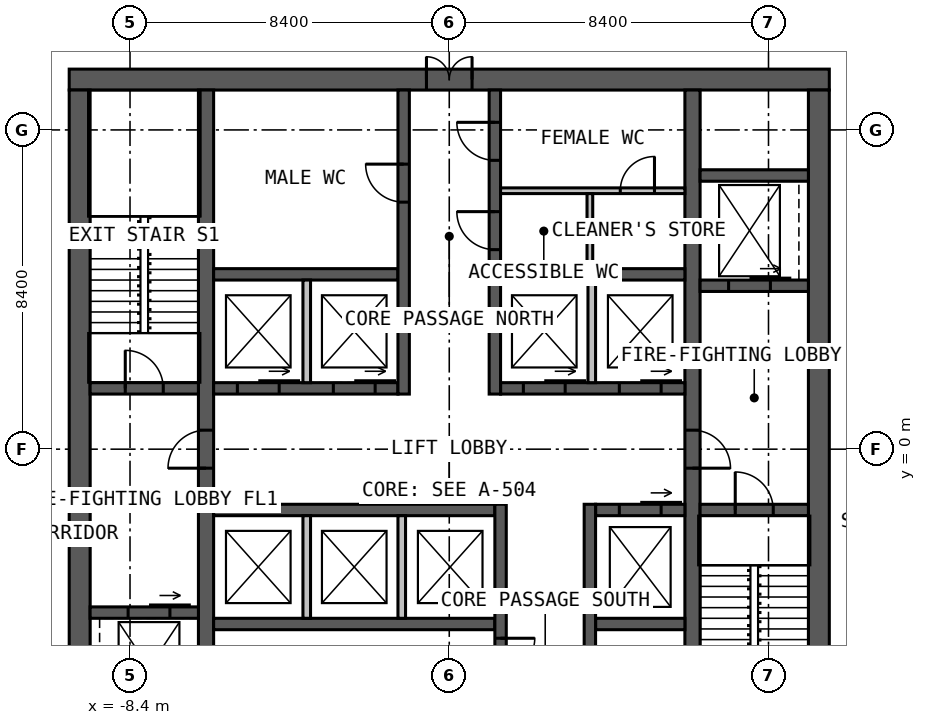
"""IFC4 building model, lengths in metres.
Left out: names, types, materials, properties, quantities, classifications, styles, units other than length and angle.
Written with IfcOpenShell. Run it as: python <this file> out.ifc"""

import sys

from ifc_helpers import new_model, si_unit, direction, frame, frame_2d, origin, place, context, subcontext, project, spatial, rectangle, extrude, element, fill, save


model = new_model("IFC4")
c1 = context("Model", 3, precision=1e-05, world=origin(), true_north=direction((0.0, 1.0)))
c2 = subcontext(c1, "Body", "Model", "MODEL_VIEW")
j1 = project(units=[si_unit("LENGTHUNIT", "METRE"), si_unit("PLANEANGLEUNIT", "RADIAN")], contexts=[c1])
p1 = place(None, origin())
s1 = spatial("IfcSite", under=j1, at=p1, CompositionType="ELEMENT")
p2 = place(p1, origin())
s2 = spatial("IfcBuilding", under=s1, at=p2, CompositionType="ELEMENT")
p3 = place(p2, frame((0.0, 0.0, 114.0)))
s3 = spatial("IfcBuildingStorey", under=s2, at=p3, CompositionType="ELEMENT", Elevation=114.0)
p4 = place(p3, frame((-10.0, 9.725, 0.0), z_axis=(0.0, 0.0, 1.0), x_axis=(1.0, 0.0, 0.0)))
e1 = element("IfcWall", 1, at=p4, inside=s3, PredefinedType="SOLIDWALL", context=c2, shape_type="SweptSolid", body=[
    extrude(rectangle(XDim=20.0, YDim=0.55, at=frame_2d((10.0, 0.0))), origin(), (0.0, 0.0, 1.0), 4.0),
])
p5 = place(p4, frame((9.4, 0.0, 0.0)))
e2 = element("IfcOpeningElement", 2, at=p5, cuts=e1, PredefinedType="OPENING", context=c2, shape_type="SweptSolid", body=[
    extrude(rectangle(XDim=1.2, YDim=2.2, at=frame_2d((0.6, 1.1))), frame((0.0, 0.285, 0.0), z_axis=(0.0, -1.0, 0.0), x_axis=(1.0, 0.0, 0.0)), (0.0, 0.0, 1.0), 0.57),
])
for number, where, z_axis, x_axis in (
    (3, (9.725, -9.45, 0.0), (0.0, 0.0, 1.0), (0.0, 1.0, 0.0)),
    (4, (-9.725, 9.45, 0.0), (0.0, 0.0, 1.0), (0.0, -1.0, 0.0)),
):
    element("IfcWall", number, at=place(p3, frame(where, z_axis=z_axis, x_axis=x_axis)), inside=s3, PredefinedType="SOLIDWALL", context=c2, shape_type="SweptSolid", body=[
        extrude(rectangle(XDim=18.9, YDim=0.55, at=frame_2d((9.45, 0.0))), origin(), (0.0, 0.0, 1.0), 4.0),
    ])
p6 = place(p3, frame((-6.4, -9.45, 0.0), z_axis=(0.0, 0.0, 1.0), x_axis=(0.0, 1.0, 0.0)))
e5 = element("IfcWall", 5, at=p6, inside=s3, PredefinedType="SOLIDWALL", context=c2, shape_type="SweptSolid", body=[
    extrude(rectangle(XDim=18.9, YDim=0.4, at=frame_2d((9.45, 0.0))), origin(), (0.0, 0.0, 1.0), 4.0),
])
p7 = place(p6, frame((8.95, 0.0, 0.0)))
e6 = element("IfcOpeningElement", 6, at=p7, cuts=e5, PredefinedType="OPENING", context=c2, shape_type="SweptSolid", body=[
    extrude(rectangle(XDim=1.0, YDim=2.2, at=frame_2d((0.5, 1.1))), frame((0.0, 0.21, 0.0), z_axis=(0.0, -1.0, 0.0), x_axis=(1.0, 0.0, 0.0)), (0.0, 0.0, 1.0), 0.42),
])
p8 = place(p3, frame((6.4, 9.45, 0.0), z_axis=(0.0, 0.0, 1.0), x_axis=(0.0, -1.0, 0.0)))
e7 = element("IfcWall", 7, at=p8, inside=s3, PredefinedType="SOLIDWALL", context=c2, shape_type="SweptSolid", body=[
    extrude(rectangle(XDim=18.9, YDim=0.4, at=frame_2d((9.45, 0.0))), origin(), (0.0, 0.0, 1.0), 4.0),
])
p9 = place(p8, frame((8.95, 0.0, 0.0)))
e8 = element("IfcOpeningElement", 8, at=p9, cuts=e7, PredefinedType="OPENING", context=c2, shape_type="SweptSolid", body=[
    extrude(rectangle(XDim=1.0, YDim=2.2, at=frame_2d((0.5, 1.1))), frame((0.0, 0.21, 0.0), z_axis=(0.0, -1.0, 0.0), x_axis=(1.0, 0.0, 0.0)), (0.0, 0.0, 1.0), 0.42),
])
p10 = place(p3, frame((-6.2, 1.6, 0.0), z_axis=(0.0, 0.0, 1.0), x_axis=(1.0, 0.0, 0.0)))
e9 = element("IfcWall", 9, at=p10, inside=s3, PredefinedType="SOLIDWALL", context=c2, shape_type="SweptSolid", body=[
    extrude(rectangle(XDim=4.85, YDim=0.3, at=frame_2d((2.425, 0.0))), origin(), (0.0, 0.0, 1.0), 4.0),
])
p11 = place(p10, frame((0.625, 0.0, 0.0)))
e10 = element("IfcOpeningElement", 10, at=p11, cuts=e9, PredefinedType="OPENING", context=c2, shape_type="SweptSolid", body=[
    extrude(rectangle(XDim=1.1, YDim=2.2, at=frame_2d((0.55, 1.1))), frame((0.0, 0.16, 0.0), z_axis=(0.0, -1.0, 0.0), x_axis=(1.0, 0.0, 0.0)), (0.0, 0.0, 1.0), 0.32),
])
p12 = place(p10, frame((3.15, 0.0, 0.0)))
e11 = element("IfcOpeningElement", 11, at=p12, cuts=e9, PredefinedType="OPENING", context=c2, shape_type="SweptSolid", body=[
    extrude(rectangle(XDim=1.1, YDim=2.2, at=frame_2d((0.55, 1.1))), frame((0.0, 0.16, 0.0), z_axis=(0.0, -1.0, 0.0), x_axis=(1.0, 0.0, 0.0)), (0.0, 0.0, 1.0), 0.32),
])
p13 = place(p3, frame((1.35, 1.6, 0.0), z_axis=(0.0, 0.0, 1.0), x_axis=(1.0, 0.0, 0.0)))
e12 = element("IfcWall", 12, at=p13, inside=s3, PredefinedType="SOLIDWALL", context=c2, shape_type="SweptSolid", body=[
    extrude(rectangle(XDim=4.85, YDim=0.3, at=frame_2d((2.425, 0.0))), origin(), (0.0, 0.0, 1.0), 4.0),
])
p14 = place(p13, frame((0.6, 0.0, 0.0)))
e13 = element("IfcOpeningElement", 13, at=p14, cuts=e12, PredefinedType="OPENING", context=c2, shape_type="SweptSolid", body=[
    extrude(rectangle(XDim=1.1, YDim=2.2, at=frame_2d((0.55, 1.1))), frame((0.0, 0.16, 0.0), z_axis=(0.0, -1.0, 0.0), x_axis=(1.0, 0.0, 0.0)), (0.0, 0.0, 1.0), 0.32),
])
p15 = place(p13, frame((3.125, 0.0, 0.0)))
e14 = element("IfcOpeningElement", 14, at=p15, cuts=e12, PredefinedType="OPENING", context=c2, shape_type="SweptSolid", body=[
    extrude(rectangle(XDim=1.1, YDim=2.2, at=frame_2d((0.55, 1.1))), frame((0.0, 0.16, 0.0), z_axis=(0.0, -1.0, 0.0), x_axis=(1.0, 0.0, 0.0)), (0.0, 0.0, 1.0), 0.32),
])
for number, where, z_axis, x_axis in (
    (15, (-6.2, 4.6, 0.0), (0.0, 0.0, 1.0), (1.0, 0.0, 0.0)),
    (16, (1.35, 4.6, 0.0), (0.0, 0.0, 1.0), (1.0, 0.0, 0.0)),
):
    element("IfcWall", number, at=place(p3, frame(where, z_axis=z_axis, x_axis=x_axis)), inside=s3, PredefinedType="SOLIDWALL", context=c2, shape_type="SweptSolid", body=[
        extrude(rectangle(XDim=4.85, YDim=0.3, at=frame_2d((2.425, 0.0))), origin(), (0.0, 0.0, 1.0), 4.0),
    ])
p16 = place(p3, frame((-1.2, 1.45, 0.0), z_axis=(0.0, 0.0, 1.0), x_axis=(0.0, 1.0, 0.0)))
e17 = element("IfcWall", 17, at=p16, inside=s3, PredefinedType="SOLIDWALL", context=c2, shape_type="SweptSolid", body=[
    extrude(rectangle(XDim=8.0, YDim=0.3, at=frame_2d((4.0, 0.0))), origin(), (0.0, 0.0, 1.0), 4.0),
])
p17 = place(p16, frame((5.05, 0.0, 0.0)))
e18 = element("IfcOpeningElement", 18, at=p17, cuts=e17, PredefinedType="OPENING", context=c2, shape_type="SweptSolid", body=[
    extrude(rectangle(XDim=1.0, YDim=2.2, at=frame_2d((0.5, 1.1))), frame((0.0, 0.16, 0.0), z_axis=(0.0, -1.0, 0.0), x_axis=(1.0, 0.0, 0.0)), (0.0, 0.0, 1.0), 0.32),
])
p18 = place(p3, frame((1.2, 1.45, 0.0), z_axis=(0.0, 0.0, 1.0), x_axis=(0.0, 1.0, 0.0)))
e19 = element("IfcWall", 19, at=p18, inside=s3, PredefinedType="SOLIDWALL", context=c2, shape_type="SweptSolid", body=[
    extrude(rectangle(XDim=8.0, YDim=0.3, at=frame_2d((4.0, 0.0))), origin(), (0.0, 0.0, 1.0), 4.0),
])
p19 = place(p18, frame((3.8, 0.0, 0.0)))
e20 = element("IfcOpeningElement", 20, at=p19, cuts=e19, PredefinedType="OPENING", context=c2, shape_type="SweptSolid", body=[
    extrude(rectangle(XDim=1.0, YDim=2.2, at=frame_2d((0.5, 1.1))), frame((0.0, 0.16, 0.0), z_axis=(0.0, -1.0, 0.0), x_axis=(1.0, 0.0, 0.0)), (0.0, 0.0, 1.0), 0.32),
])
p20 = place(p18, frame((6.15, 0.0, 0.0)))
e21 = element("IfcOpeningElement", 21, at=p20, cuts=e19, PredefinedType="OPENING", context=c2, shape_type="SweptSolid", body=[
    extrude(rectangle(XDim=1.0, YDim=2.2, at=frame_2d((0.5, 1.1))), frame((0.0, 0.16, 0.0), z_axis=(0.0, -1.0, 0.0), x_axis=(1.0, 0.0, 0.0)), (0.0, 0.0, 1.0), 0.32),
])
p21 = place(p3, frame((-6.2, -1.6, 0.0), z_axis=(0.0, 0.0, 1.0), x_axis=(1.0, 0.0, 0.0)))
e22 = element("IfcWall", 22, at=p21, inside=s3, PredefinedType="SOLIDWALL", context=c2, shape_type="SweptSolid", body=[
    extrude(rectangle(XDim=7.4, YDim=0.3, at=frame_2d((3.7, 0.0))), origin(), (0.0, 0.0, 1.0), 4.0),
])
p22 = place(p3, frame((3.85, -1.6, 0.0), z_axis=(0.0, 0.0, 1.0), x_axis=(1.0, 0.0, 0.0)))
e23 = element("IfcWall", 23, at=p22, inside=s3, PredefinedType="SOLIDWALL", context=c2, shape_type="SweptSolid", body=[
    extrude(rectangle(XDim=2.35, YDim=0.3, at=frame_2d((1.175, 0.0))), origin(), (0.0, 0.0, 1.0), 4.0),
])
p23 = place(p22, frame((0.625, 0.0, 0.0)))
e24 = element("IfcOpeningElement", 24, at=p23, cuts=e23, PredefinedType="OPENING", context=c2, shape_type="SweptSolid", body=[
    extrude(rectangle(XDim=1.1, YDim=2.2, at=frame_2d((0.55, 1.1))), frame((0.0, 0.16, 0.0), z_axis=(0.0, -1.0, 0.0), x_axis=(1.0, 0.0, 0.0)), (0.0, 0.0, 1.0), 0.32),
])
p24 = place(p3, frame((-6.2, -4.6, 0.0), z_axis=(0.0, 0.0, 1.0), x_axis=(1.0, 0.0, 0.0)))
e25 = element("IfcWall", 25, at=p24, inside=s3, PredefinedType="SOLIDWALL", context=c2, shape_type="SweptSolid", body=[
    extrude(rectangle(XDim=7.4, YDim=0.3, at=frame_2d((3.7, 0.0))), origin(), (0.0, 0.0, 1.0), 4.0),
])
p25 = place(p3, frame((3.85, -4.6, 0.0), z_axis=(0.0, 0.0, 1.0), x_axis=(1.0, 0.0, 0.0)))
e26 = element("IfcWall", 26, at=p25, inside=s3, PredefinedType="SOLIDWALL", context=c2, shape_type="SweptSolid", body=[
    extrude(rectangle(XDim=2.35, YDim=0.3, at=frame_2d((1.175, 0.0))), origin(), (0.0, 0.0, 1.0), 4.0),
])
p26 = place(p3, frame((1.35, -1.45, 0.0), z_axis=(0.0, 0.0, 1.0), x_axis=(0.0, -1.0, 0.0)))
e27 = element("IfcWall", 27, at=p26, inside=s3, PredefinedType="SOLIDWALL", context=c2, shape_type="SweptSolid", body=[
    extrude(rectangle(XDim=8.0, YDim=0.3, at=frame_2d((4.0, 0.0))), origin(), (0.0, 0.0, 1.0), 4.0),
])
p27 = place(p26, frame((5.925, 0.0, 0.0)))
e28 = element("IfcOpeningElement", 28, at=p27, cuts=e27, PredefinedType="OPENING", context=c2, shape_type="SweptSolid", body=[
    extrude(rectangle(XDim=1.0, YDim=2.2, at=frame_2d((0.5, 1.1))), frame((0.0, 0.16, 0.0), z_axis=(0.0, -1.0, 0.0), x_axis=(1.0, 0.0, 0.0)), (0.0, 0.0, 1.0), 0.32),
])
p28 = place(p26, frame((3.525, 0.0, 0.0)))
e29 = element("IfcOpeningElement", 29, at=p28, cuts=e27, PredefinedType="OPENING", context=c2, shape_type="SweptSolid", body=[
    extrude(rectangle(XDim=0.9, YDim=2.2, at=frame_2d((0.45, 1.1))), frame((0.0, 0.16, 0.0), z_axis=(0.0, -1.0, 0.0), x_axis=(1.0, 0.0, 0.0)), (0.0, 0.0, 1.0), 0.32),
])
p29 = place(p3, frame((3.7, -1.45, 0.0), z_axis=(0.0, 0.0, 1.0), x_axis=(0.0, -1.0, 0.0)))
e30 = element("IfcWall", 30, at=p29, inside=s3, PredefinedType="SOLIDWALL", context=c2, shape_type="SweptSolid", body=[
    extrude(rectangle(XDim=8.0, YDim=0.3, at=frame_2d((4.0, 0.0))), origin(), (0.0, 0.0, 1.0), 4.0),
])
p30 = place(p29, frame((5.1, 0.0, 0.0)))
e31 = element("IfcOpeningElement", 31, at=p30, cuts=e30, PredefinedType="OPENING", context=c2, shape_type="SweptSolid", body=[
    extrude(rectangle(XDim=0.9, YDim=2.2, at=frame_2d((0.45, 1.1))), frame((0.0, 0.16, 0.0), z_axis=(0.0, -1.0, 0.0), x_axis=(1.0, 0.0, 0.0)), (0.0, 0.0, 1.0), 0.32),
])
p31 = place(p3, frame((-9.45, 1.6, 0.0), z_axis=(0.0, 0.0, 1.0), x_axis=(1.0, 0.0, 0.0)))
e32 = element("IfcWall", 32, at=p31, inside=s3, PredefinedType="SOLIDWALL", context=c2, shape_type="SweptSolid", body=[
    extrude(rectangle(XDim=2.85, YDim=0.3, at=frame_2d((1.425, 0.0))), origin(), (0.0, 0.0, 1.0), 4.0),
])
p32 = place(p31, frame((0.925, 0.0, 0.0)))
e33 = element("IfcOpeningElement", 33, at=p32, cuts=e32, PredefinedType="OPENING", context=c2, shape_type="SweptSolid", body=[
    extrude(rectangle(XDim=1.0, YDim=2.2, at=frame_2d((0.5, 1.1))), frame((0.0, 0.16, 0.0), z_axis=(0.0, -1.0, 0.0), x_axis=(1.0, 0.0, 0.0)), (0.0, 0.0, 1.0), 0.32),
])
p33 = place(p3, frame((6.6, -1.6, 0.0), z_axis=(0.0, 0.0, 1.0), x_axis=(1.0, 0.0, 0.0)))
e34 = element("IfcWall", 34, at=p33, inside=s3, PredefinedType="SOLIDWALL", context=c2, shape_type="SweptSolid", body=[
    extrude(rectangle(XDim=2.85, YDim=0.3, at=frame_2d((1.425, 0.0))), origin(), (0.0, 0.0, 1.0), 4.0),
])
p34 = place(p33, frame((0.925, 0.0, 0.0)))
e35 = element("IfcOpeningElement", 35, at=p34, cuts=e34, PredefinedType="OPENING", context=c2, shape_type="SweptSolid", body=[
    extrude(rectangle(XDim=1.0, YDim=2.2, at=frame_2d((0.5, 1.1))), frame((0.0, 0.16, 0.0), z_axis=(0.0, -1.0, 0.0), x_axis=(1.0, 0.0, 0.0)), (0.0, 0.0, 1.0), 0.32),
])
p35 = place(p3, frame((-9.45, -4.3, 0.0), z_axis=(0.0, 0.0, 1.0), x_axis=(1.0, 0.0, 0.0)))
e36 = element("IfcWall", 36, at=p35, inside=s3, PredefinedType="SOLIDWALL", context=c2, shape_type="SweptSolid", body=[
    extrude(rectangle(XDim=2.85, YDim=0.3, at=frame_2d((1.425, 0.0))), origin(), (0.0, 0.0, 1.0), 4.0),
])
p36 = place(p35, frame((1.0, 0.0, 0.0)))
e37 = element("IfcOpeningElement", 37, at=p36, cuts=e36, PredefinedType="OPENING", context=c2, shape_type="SweptSolid", body=[
    extrude(rectangle(XDim=1.1, YDim=2.2, at=frame_2d((0.55, 1.1))), frame((0.0, 0.16, 0.0), z_axis=(0.0, -1.0, 0.0), x_axis=(1.0, 0.0, 0.0)), (0.0, 0.0, 1.0), 0.32),
])
p37 = place(p3, frame((6.6, 4.3, 0.0), z_axis=(0.0, 0.0, 1.0), x_axis=(1.0, 0.0, 0.0)))
e38 = element("IfcWall", 38, at=p37, inside=s3, PredefinedType="SOLIDWALL", context=c2, shape_type="SweptSolid", body=[
    extrude(rectangle(XDim=2.85, YDim=0.3, at=frame_2d((1.425, 0.0))), origin(), (0.0, 0.0, 1.0), 4.0),
])
p38 = place(p37, frame((0.75, 0.0, 0.0)))
e39 = element("IfcOpeningElement", 39, at=p38, cuts=e38, PredefinedType="OPENING", context=c2, shape_type="SweptSolid", body=[
    extrude(rectangle(XDim=1.1, YDim=2.2, at=frame_2d((0.55, 1.1))), frame((0.0, 0.16, 0.0), z_axis=(0.0, -1.0, 0.0), x_axis=(1.0, 0.0, 0.0)), (0.0, 0.0, 1.0), 0.32),
])
p39 = place(p3, frame((6.6, 7.2, 0.0), z_axis=(0.0, 0.0, 1.0), x_axis=(1.0, 0.0, 0.0)))
e40 = element("IfcWall", 40, at=p39, inside=s3, PredefinedType="SOLIDWALL", context=c2, shape_type="SweptSolid", body=[
    extrude(rectangle(XDim=2.85, YDim=0.3, at=frame_2d((1.425, 0.0))), origin(), (0.0, 0.0, 1.0), 4.0),
])
for number, where, z_axis, x_axis in (
    (41, (-3.75, 1.75, 0.0), (0.0, 0.0, 1.0), (0.0, 1.0, 0.0)),
    (42, (3.75, 1.75, 0.0), (0.0, 0.0, 1.0), (0.0, 1.0, 0.0)),
    (43, (-3.75, -1.75, 0.0), (0.0, 0.0, 1.0), (0.0, -1.0, 0.0)),
    (44, (-1.25, -1.75, 0.0), (0.0, 0.0, 1.0), (0.0, -1.0, 0.0)),
):
    element("IfcWall", number, at=place(p3, frame(where, z_axis=z_axis, x_axis=x_axis)), inside=s3, PredefinedType="SOLIDWALL", context=c2, shape_type="SweptSolid", body=[
        extrude(rectangle(XDim=2.7, YDim=0.2, at=frame_2d((1.35, 0.0))), origin(), (0.0, 0.0, 1.0), 3.75),
    ])
p40 = place(p3, frame((1.35, 6.8, 0.0), z_axis=(0.0, 0.0, 1.0), x_axis=(1.0, 0.0, 0.0)))
e45 = element("IfcWall", 45, at=p40, inside=s3, PredefinedType="PARTITIONING", context=c2, shape_type="SweptSolid", body=[
    extrude(rectangle(XDim=4.85, YDim=0.15, at=frame_2d((2.425, 0.0))), origin(), (0.0, 0.0, 1.0), 3.75),
])
p41 = place(p40, frame((3.15, 0.0, 0.0)))
e46 = element("IfcOpeningElement", 46, at=p41, cuts=e45, PredefinedType="OPENING", context=c2, shape_type="SweptSolid", body=[
    extrude(rectangle(XDim=0.9, YDim=2.2, at=frame_2d((0.45, 1.1))), frame((0.0, 0.085, 0.0), z_axis=(0.0, -1.0, 0.0), x_axis=(1.0, 0.0, 0.0)), (0.0, 0.0, 1.0), 0.17),
])
p42 = place(p3, frame((3.7, 4.75, 0.0), z_axis=(0.0, 0.0, 1.0), x_axis=(0.0, 1.0, 0.0)))
e47 = element("IfcWall", 47, at=p42, inside=s3, PredefinedType="PARTITIONING", context=c2, shape_type="SweptSolid", body=[
    extrude(rectangle(XDim=1.975, YDim=0.15, at=frame_2d((0.988, 0.0))), origin(), (0.0, 0.0, 1.0), 3.75),
])
p43 = place(p5, origin())
e48 = element("IfcDoor", 48, at=p43, inside=s3, OperationType="DOUBLE_DOOR_SINGLE_SWING", PredefinedType="DOOR", context=c2, shape_type="SweptSolid", body=[
    extrude(rectangle(XDim=1.2, YDim=2.2, at=frame_2d((0.6, 1.1))), frame((0.0, 0.025, 0.0), z_axis=(0.0, -1.0, 0.0), x_axis=(1.0, 0.0, 0.0)), (0.0, 0.0, 1.0), 0.05),
])
fill(e2, e48)
p44 = place(p7, origin())
e49 = element("IfcDoor", 49, at=p44, inside=s3, OperationType="SINGLE_SWING_LEFT", PredefinedType="DOOR", context=c2, shape_type="SweptSolid", body=[
    extrude(rectangle(XDim=1.0, YDim=2.2, at=frame_2d((0.5, 1.1))), frame((0.0, 0.025, 0.0), z_axis=(0.0, -1.0, 0.0), x_axis=(1.0, 0.0, 0.0)), (0.0, 0.0, 1.0), 0.05),
])
fill(e6, e49)
p45 = place(p9, origin())
e50 = element("IfcDoor", 50, at=p45, inside=s3, OperationType="SINGLE_SWING_RIGHT", PredefinedType="DOOR", context=c2, shape_type="SweptSolid", body=[
    extrude(rectangle(XDim=1.0, YDim=2.2, at=frame_2d((0.5, 1.1))), frame((0.0, 0.025, 0.0), z_axis=(0.0, -1.0, 0.0), x_axis=(1.0, 0.0, 0.0)), (0.0, 0.0, 1.0), 0.05),
])
fill(e8, e50)
p46 = place(p32, origin())
e51 = element("IfcDoor", 51, at=p46, inside=s3, OperationType="SINGLE_SWING_LEFT", PredefinedType="DOOR", context=c2, shape_type="SweptSolid", body=[
    extrude(rectangle(XDim=1.0, YDim=2.2, at=frame_2d((0.5, 1.1))), frame((0.0, 0.025, 0.0), z_axis=(0.0, -1.0, 0.0), x_axis=(1.0, 0.0, 0.0)), (0.0, 0.0, 1.0), 0.05),
])
fill(e33, e51)
p47 = place(p34, origin())
e52 = element("IfcDoor", 52, at=p47, inside=s3, OperationType="SINGLE_SWING_LEFT", PredefinedType="DOOR", context=c2, shape_type="SweptSolid", body=[
    extrude(rectangle(XDim=1.0, YDim=2.2, at=frame_2d((0.5, 1.1))), frame((0.0, 0.025, 0.0), z_axis=(0.0, -1.0, 0.0), x_axis=(1.0, 0.0, 0.0)), (0.0, 0.0, 1.0), 0.05),
])
fill(e35, e52)
p48 = place(p17, origin())
e53 = element("IfcDoor", 53, at=p48, inside=s3, OperationType="SINGLE_SWING_RIGHT", PredefinedType="DOOR", context=c2, shape_type="SweptSolid", body=[
    extrude(rectangle(XDim=1.0, YDim=2.2, at=frame_2d((0.5, 1.1))), frame((0.0, 0.025, 0.0), z_axis=(0.0, -1.0, 0.0), x_axis=(1.0, 0.0, 0.0)), (0.0, 0.0, 1.0), 0.05),
])
fill(e18, e53)
p49 = place(p19, origin())
e54 = element("IfcDoor", 54, at=p49, inside=s3, OperationType="SINGLE_SWING_RIGHT", PredefinedType="DOOR", context=c2, shape_type="SweptSolid", body=[
    extrude(rectangle(XDim=1.0, YDim=2.2, at=frame_2d((0.5, 1.1))), frame((0.0, 0.025, 0.0), z_axis=(0.0, -1.0, 0.0), x_axis=(1.0, 0.0, 0.0)), (0.0, 0.0, 1.0), 0.05),
])
fill(e20, e54)
p50 = place(p20, origin())
e55 = element("IfcDoor", 55, at=p50, inside=s3, OperationType="SINGLE_SWING_RIGHT", PredefinedType="DOOR", context=c2, shape_type="SweptSolid", body=[
    extrude(rectangle(XDim=1.0, YDim=2.2, at=frame_2d((0.5, 1.1))), frame((0.0, 0.025, 0.0), z_axis=(0.0, -1.0, 0.0), x_axis=(1.0, 0.0, 0.0)), (0.0, 0.0, 1.0), 0.05),
])
fill(e21, e55)
p51 = place(p28, origin())
e56 = element("IfcDoor", 56, at=p51, inside=s3, OperationType="SINGLE_SWING_LEFT", PredefinedType="DOOR", context=c2, shape_type="SweptSolid", body=[
    extrude(rectangle(XDim=0.9, YDim=2.2, at=frame_2d((0.45, 1.1))), frame((0.0, 0.025, 0.0), z_axis=(0.0, -1.0, 0.0), x_axis=(1.0, 0.0, 0.0)), (0.0, 0.0, 1.0), 0.05),
])
fill(e29, e56)
p52 = place(p41, origin())
e57 = element("IfcDoor", 57, at=p52, inside=s3, OperationType="SINGLE_SWING_RIGHT", PredefinedType="DOOR", context=c2, shape_type="SweptSolid", body=[
    extrude(rectangle(XDim=0.9, YDim=2.2, at=frame_2d((0.45, 1.1))), frame((0.0, 0.025, 0.0), z_axis=(0.0, -1.0, 0.0), x_axis=(1.0, 0.0, 0.0)), (0.0, 0.0, 1.0), 0.05),
])
fill(e46, e57)
p53 = place(p11, origin())
e58 = element("IfcDoor", 58, at=p53, inside=s3, OperationType="SLIDING_TO_LEFT", PredefinedType="DOOR", context=c2, shape_type="SweptSolid", body=[
    extrude(rectangle(XDim=1.1, YDim=2.2, at=frame_2d((0.55, 1.1))), frame((0.0, 0.025, 0.0), z_axis=(0.0, -1.0, 0.0), x_axis=(1.0, 0.0, 0.0)), (0.0, 0.0, 1.0), 0.05),
])
fill(e10, e58)
p54 = place(p12, origin())
e59 = element("IfcDoor", 59, at=p54, inside=s3, OperationType="SLIDING_TO_LEFT", PredefinedType="DOOR", context=c2, shape_type="SweptSolid", body=[
    extrude(rectangle(XDim=1.1, YDim=2.2, at=frame_2d((0.55, 1.1))), frame((0.0, 0.025, 0.0), z_axis=(0.0, -1.0, 0.0), x_axis=(1.0, 0.0, 0.0)), (0.0, 0.0, 1.0), 0.05),
])
fill(e11, e59)
p55 = place(p14, origin())
e60 = element("IfcDoor", 60, at=p55, inside=s3, OperationType="SLIDING_TO_LEFT", PredefinedType="DOOR", context=c2, shape_type="SweptSolid", body=[
    extrude(rectangle(XDim=1.1, YDim=2.2, at=frame_2d((0.55, 1.1))), frame((0.0, 0.025, 0.0), z_axis=(0.0, -1.0, 0.0), x_axis=(1.0, 0.0, 0.0)), (0.0, 0.0, 1.0), 0.05),
])
fill(e13, e60)
p56 = place(p15, origin())
e61 = element("IfcDoor", 61, at=p56, inside=s3, OperationType="SLIDING_TO_LEFT", PredefinedType="DOOR", context=c2, shape_type="SweptSolid", body=[
    extrude(rectangle(XDim=1.1, YDim=2.2, at=frame_2d((0.55, 1.1))), frame((0.0, 0.025, 0.0), z_axis=(0.0, -1.0, 0.0), x_axis=(1.0, 0.0, 0.0)), (0.0, 0.0, 1.0), 0.05),
])
fill(e14, e61)
p57 = place(p23, origin())
e62 = element("IfcDoor", 62, at=p57, inside=s3, OperationType="SLIDING_TO_LEFT", PredefinedType="DOOR", context=c2, shape_type="SweptSolid", body=[
    extrude(rectangle(XDim=1.1, YDim=2.2, at=frame_2d((0.55, 1.1))), frame((0.0, 0.025, 0.0), z_axis=(0.0, -1.0, 0.0), x_axis=(1.0, 0.0, 0.0)), (0.0, 0.0, 1.0), 0.05),
])
fill(e24, e62)
p58 = place(p36, origin())
e63 = element("IfcDoor", 63, at=p58, inside=s3, OperationType="SLIDING_TO_LEFT", PredefinedType="DOOR", context=c2, shape_type="SweptSolid", body=[
    extrude(rectangle(XDim=1.1, YDim=2.2, at=frame_2d((0.55, 1.1))), frame((0.0, 0.025, 0.0), z_axis=(0.0, -1.0, 0.0), x_axis=(1.0, 0.0, 0.0)), (0.0, 0.0, 1.0), 0.05),
])
fill(e37, e63)
p59 = place(p38, origin())
e64 = element("IfcDoor", 64, at=p59, inside=s3, OperationType="SLIDING_TO_LEFT", PredefinedType="DOOR", context=c2, shape_type="SweptSolid", body=[
    extrude(rectangle(XDim=1.1, YDim=2.2, at=frame_2d((0.55, 1.1))), frame((0.0, 0.025, 0.0), z_axis=(0.0, -1.0, 0.0), x_axis=(1.0, 0.0, 0.0)), (0.0, 0.0, 1.0), 0.05),
])
fill(e39, e64)
save(model, sys.argv[1])
